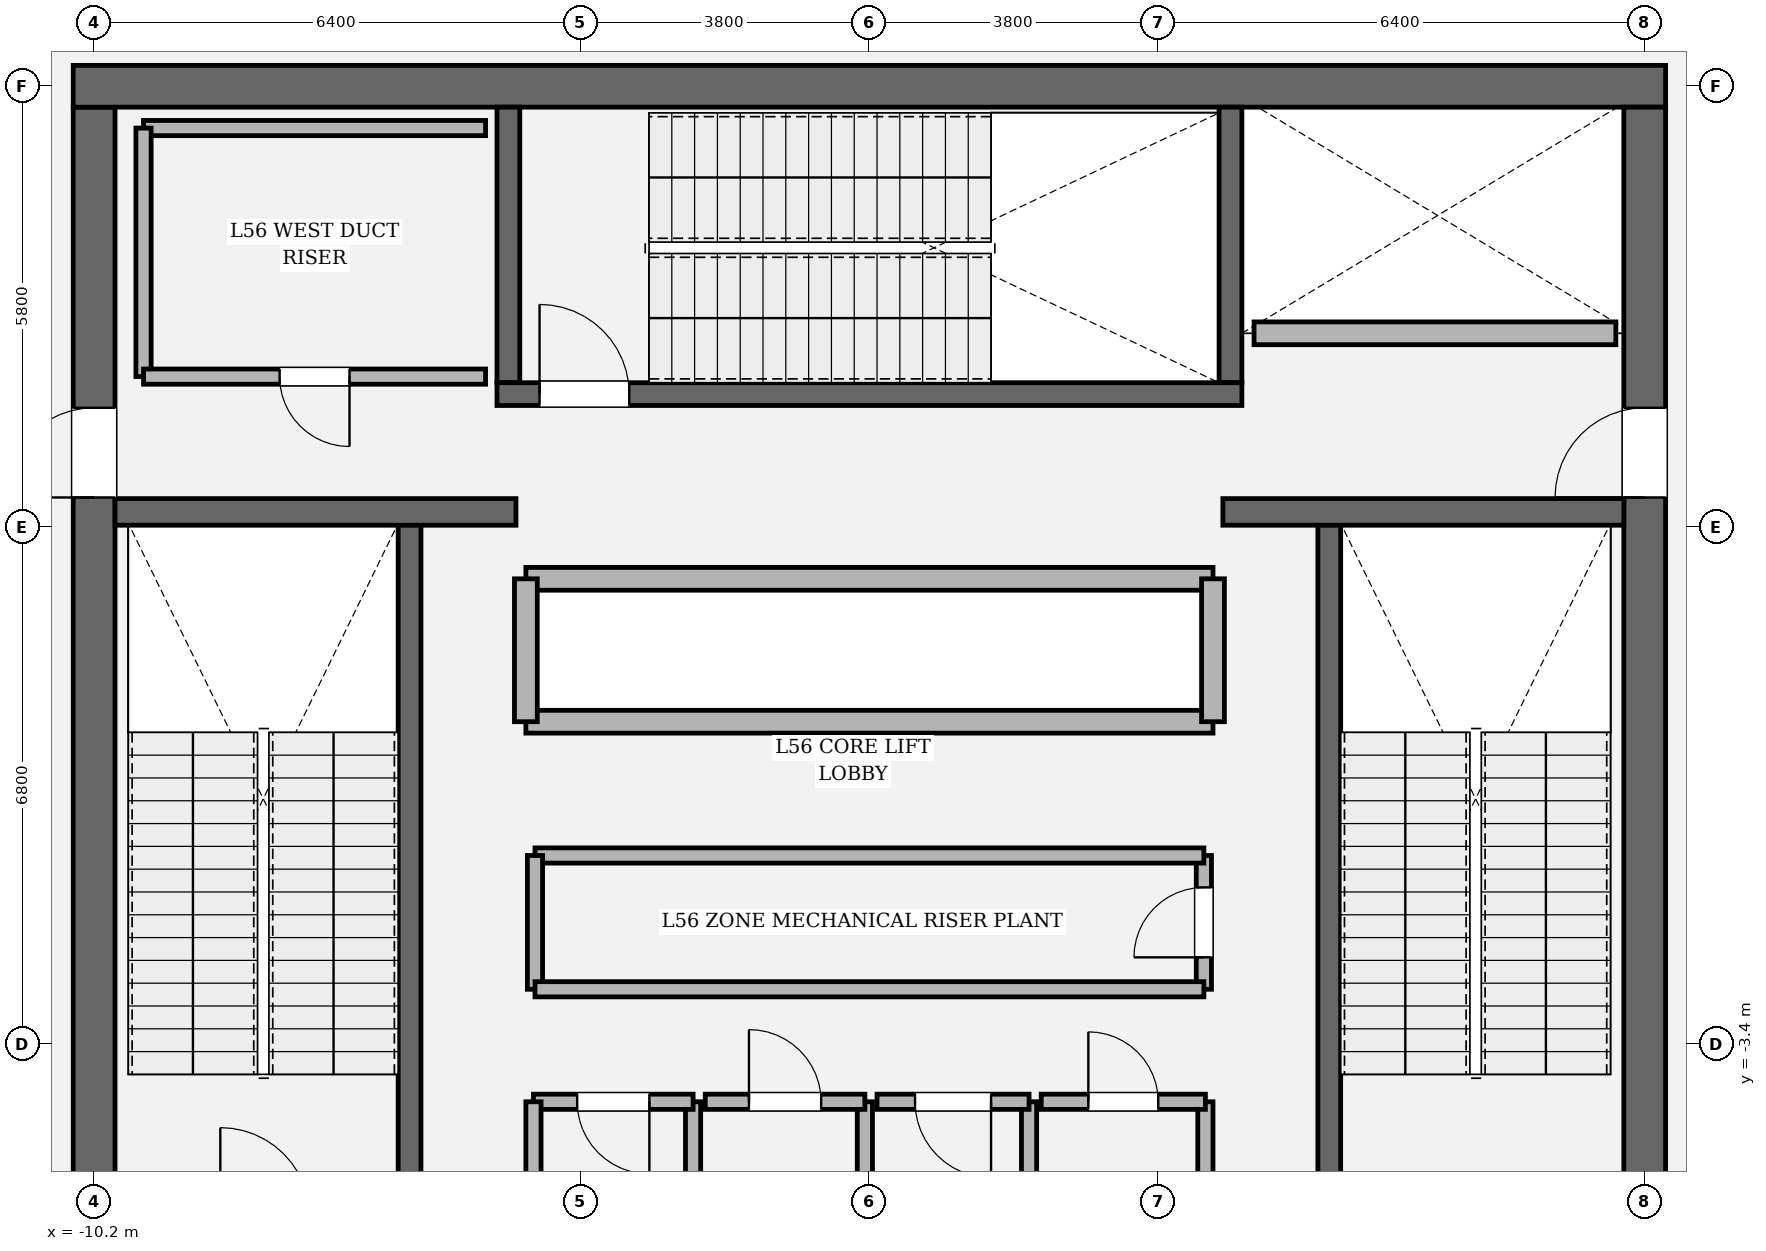
"""IFC4 building model, lengths in metres.
Left out: names, types, materials, properties, quantities, classifications, styles, units other than length and angle.
Written with IfcOpenShell. Run it as: python <this file> out.ifc"""

import sys

from ifc_helpers import new_model, si_unit, direction, frame, frame_2d, origin, place, context, subcontext, project, spatial, rectangle, extrude, element, fill, save


model = new_model("IFC4")
c1 = context("Model", 3, precision=1e-05, world=origin(), true_north=direction((0.0, 1.0)))
c2 = subcontext(c1, "Body", "Model", "MODEL_VIEW")
j1 = project(units=[si_unit("LENGTHUNIT", "METRE"), si_unit("PLANEANGLEUNIT", "RADIAN")], contexts=[c1])
p1 = place(None, origin())
s1 = spatial("IfcSite", under=j1, at=p1, CompositionType="ELEMENT")
p2 = place(p1, origin())
s2 = spatial("IfcBuilding", under=s1, at=p2, CompositionType="ELEMENT")
p3 = place(p2, frame((0.0, 0.0, 237.0)))
s3 = spatial("IfcBuildingStorey", under=s2, at=p3, CompositionType="ELEMENT", Elevation=237.0)
p4 = place(p3, frame((-10.2, -8.925, 0.0), z_axis=(0.0, 0.0, 1.0), x_axis=(0.0, 1.0, 0.0)))
e1 = element("IfcWall", 1, at=p4, inside=s3, PredefinedType="SHEAR", context=c2, shape_type="SweptSolid", body=[
    extrude(rectangle(XDim=17.85, YDim=0.55, at=frame_2d((8.925, 0.0))), origin(), (0.0, 0.0, 1.0), 4.8),
])
p5 = place(p4, frame((12.715, 0.0, 0.0)))
e2 = element("IfcOpeningElement", 2, at=p5, cuts=e1, PredefinedType="OPENING", context=c2, shape_type="SweptSolid", body=[
    extrude(rectangle(XDim=1.18, YDim=2.2, at=frame_2d((0.59, 1.1))), frame((0.0, 0.285, 0.0), z_axis=(0.0, -1.0, 0.0), x_axis=(1.0, 0.0, 0.0)), (0.0, 0.0, 1.0), 0.57),
])
p6 = place(p3, frame((-10.475, 9.2, 0.0), z_axis=(0.0, 0.0, 1.0), x_axis=(1.0, 0.0, 0.0)))
e3 = element("IfcWall", 3, at=p6, inside=s3, PredefinedType="SHEAR", context=c2, shape_type="SweptSolid", body=[
    extrude(rectangle(XDim=20.95, YDim=0.55, at=frame_2d((10.475, 0.0))), origin(), (0.0, 0.0, 1.0), 4.8),
])
p7 = place(p3, frame((10.2, 8.925, 0.0), z_axis=(0.0, 0.0, 1.0), x_axis=(0.0, -1.0, 0.0)))
e4 = element("IfcWall", 4, at=p7, inside=s3, PredefinedType="SHEAR", context=c2, shape_type="SweptSolid", body=[
    extrude(rectangle(XDim=17.85, YDim=0.55, at=frame_2d((8.925, 0.0))), origin(), (0.0, 0.0, 1.0), 4.8),
])
p8 = place(p7, frame((3.955, 0.0, 0.0)))
e5 = element("IfcOpeningElement", 5, at=p8, cuts=e4, PredefinedType="OPENING", context=c2, shape_type="SweptSolid", body=[
    extrude(rectangle(XDim=1.18, YDim=2.2, at=frame_2d((0.59, 1.1))), frame((0.0, 0.285, 0.0), z_axis=(0.0, -1.0, 0.0), x_axis=(1.0, 0.0, 0.0)), (0.0, 0.0, 1.0), 0.57),
])
for number, where, z_axis, x_axis in (
    (6, (-6.05, -5.5, 0.0), (0.0, 0.0, 1.0), (0.0, 1.0, 0.0)),
    (7, (6.05, 3.45, 0.0), (0.0, 0.0, 1.0), (0.0, -1.0, 0.0)),
):
    element("IfcWall", number, at=place(p3, frame(where, z_axis=z_axis, x_axis=x_axis)), inside=s3, PredefinedType="SOLIDWALL", context=c2, shape_type="SweptSolid", body=[
        extrude(rectangle(XDim=8.95, YDim=0.3, at=frame_2d((4.475, 0.0))), origin(), (0.0, 0.0, 1.0), 4.8),
    ])
for number, where, z_axis, x_axis in (
    (8, (-4.75, 5.3, 0.0), (0.0, 0.0, 1.0), (0.0, 1.0, 0.0)),
    (9, (4.75, 8.925, 0.0), (0.0, 0.0, 1.0), (0.0, -1.0, 0.0)),
):
    element("IfcWall", number, at=place(p3, frame(where, z_axis=z_axis, x_axis=x_axis)), inside=s3, PredefinedType="SOLIDWALL", context=c2, shape_type="SweptSolid", body=[
        extrude(rectangle(XDim=3.625, YDim=0.3, at=frame_2d((1.812, 0.0))), origin(), (0.0, 0.0, 1.0), 4.8),
    ])
p9 = place(p3, frame((-4.9, 5.15, 0.0), z_axis=(0.0, 0.0, 1.0), x_axis=(1.0, 0.0, 0.0)))
e10 = element("IfcWall", 10, at=p9, inside=s3, PredefinedType="SOLIDWALL", context=c2, shape_type="SweptSolid", body=[
    extrude(rectangle(XDim=9.8, YDim=0.3, at=frame_2d((4.9, 0.0))), origin(), (0.0, 0.0, 1.0), 4.8),
])
p10 = place(p9, frame((0.56, 0.0, 0.0)))
e11 = element("IfcOpeningElement", 11, at=p10, cuts=e10, PredefinedType="OPENING", context=c2, shape_type="SweptSolid", body=[
    extrude(rectangle(XDim=1.18, YDim=2.2, at=frame_2d((0.59, 1.1))), frame((0.0, 0.16, 0.0), z_axis=(0.0, -1.0, 0.0), x_axis=(1.0, 0.0, 0.0)), (0.0, 0.0, 1.0), 0.32),
])
for number, where, z_axis, x_axis in (
    (12, (-9.925, 3.6, 0.0), (0.0, 0.0, 1.0), (1.0, 0.0, 0.0)),
    (13, (4.65, 3.6, 0.0), (0.0, 0.0, 1.0), (1.0, 0.0, 0.0)),
):
    element("IfcWall", number, at=place(p3, frame(where, z_axis=z_axis, x_axis=x_axis)), inside=s3, PredefinedType="SOLIDWALL", context=c2, shape_type="SweptSolid", body=[
        extrude(rectangle(XDim=5.275, YDim=0.35, at=frame_2d((2.638, 0.0))), origin(), (0.0, 0.0, 1.0), 4.8),
    ])
for number, where, z_axis, x_axis in (
    (14, (-4.52, 0.84, 0.0), (0.0, 0.0, 1.0), (1.0, 0.0, 0.0)),
    (15, (-4.52, 2.72, 0.0), (0.0, 0.0, 1.0), (1.0, 0.0, 0.0)),
):
    element("IfcWall", number, at=place(p3, frame(where, z_axis=z_axis, x_axis=x_axis)), inside=s3, PredefinedType="SOLIDWALL", context=c2, shape_type="SweptSolid", body=[
        extrude(rectangle(XDim=9.04, YDim=0.3, at=frame_2d((4.52, 0.0))), origin(), (0.0, 0.0, 1.0), 4.48),
    ])
for number, where, z_axis, x_axis in (
    (16, (-4.52, 0.84, 0.0), (0.0, 0.0, 1.0), (0.0, 1.0, 0.0)),
    (17, (4.52, 0.84, 0.0), (0.0, 0.0, 1.0), (0.0, 1.0, 0.0)),
):
    element("IfcWall", number, at=place(p3, frame(where, z_axis=z_axis, x_axis=x_axis)), inside=s3, PredefinedType="SOLIDWALL", context=c2, shape_type="SweptSolid", body=[
        extrude(rectangle(XDim=1.88, YDim=0.3, at=frame_2d((0.94, 0.0))), origin(), (0.0, 0.0, 1.0), 4.48),
    ])
p11 = place(p3, frame((5.06, 5.95, 0.0), z_axis=(0.0, 0.0, 1.0), x_axis=(1.0, 0.0, 0.0)))
e18 = element("IfcWall", 18, at=p11, inside=s3, PredefinedType="SOLIDWALL", context=c2, shape_type="SweptSolid", body=[
    extrude(rectangle(XDim=4.76, YDim=0.3, at=frame_2d((2.38, 0.0))), origin(), (0.0, 0.0, 1.0), 4.48),
])
p12 = place(p3, frame((-2.32, -5.9, 0.0), z_axis=(0.0, 0.0, 1.0), x_axis=(0.0, 1.0, 0.0)))
e19 = element("IfcWall", 19, at=p12, inside=s3, PredefinedType="SOLIDWALL", context=c2, shape_type="SweptSolid", body=[
    extrude(rectangle(XDim=1.74, YDim=0.2, at=frame_2d((0.87, 0.0))), origin(), (0.0, 0.0, 1.0), 4.48),
])
p13 = place(p3, frame((-2.32, -4.16, 0.0), z_axis=(0.0, 0.0, 1.0), x_axis=(-1.0, 0.0, 0.0)))
e20 = element("IfcWall", 20, at=p13, inside=s3, PredefinedType="SOLIDWALL", context=c2, shape_type="SweptSolid", body=[
    extrude(rectangle(XDim=2.1, YDim=0.2, at=frame_2d((1.05, 0.0))), origin(), (0.0, 0.0, 1.0), 4.48),
])
p14 = place(p13, frame((0.575, 0.0, 0.0)))
e21 = element("IfcOpeningElement", 21, at=p14, cuts=e20, PredefinedType="OPENING", context=c2, shape_type="SweptSolid", body=[
    extrude(rectangle(XDim=0.95, YDim=2.15, at=frame_2d((0.475, 1.075))), frame((0.0, 0.11, 0.0), z_axis=(0.0, -1.0, 0.0), x_axis=(1.0, 0.0, 0.0)), (0.0, 0.0, 1.0), 0.22),
])
for number, where, z_axis, x_axis in (
    (22, (-4.42, -4.16, 0.0), (0.0, 0.0, 1.0), (0.0, -1.0, 0.0)),
    (23, (-0.06, -5.9, 0.0), (0.0, 0.0, 1.0), (0.0, 1.0, 0.0)),
):
    element("IfcWall", number, at=place(p3, frame(where, z_axis=z_axis, x_axis=x_axis)), inside=s3, PredefinedType="SOLIDWALL", context=c2, shape_type="SweptSolid", body=[
        extrude(rectangle(XDim=1.74, YDim=0.2, at=frame_2d((0.87, 0.0))), origin(), (0.0, 0.0, 1.0), 4.48),
    ])
p15 = place(p3, frame((-0.06, -4.16, 0.0), z_axis=(0.0, 0.0, 1.0), x_axis=(-1.0, 0.0, 0.0)))
e24 = element("IfcWall", 24, at=p15, inside=s3, PredefinedType="SOLIDWALL", context=c2, shape_type="SweptSolid", body=[
    extrude(rectangle(XDim=2.1, YDim=0.2, at=frame_2d((1.05, 0.0))), origin(), (0.0, 0.0, 1.0), 4.48),
])
p16 = place(p15, frame((0.575, 0.0, 0.0)))
e25 = element("IfcOpeningElement", 25, at=p16, cuts=e24, PredefinedType="OPENING", context=c2, shape_type="SweptSolid", body=[
    extrude(rectangle(XDim=0.95, YDim=2.15, at=frame_2d((0.475, 1.075))), frame((0.0, 0.11, 0.0), z_axis=(0.0, -1.0, 0.0), x_axis=(1.0, 0.0, 0.0)), (0.0, 0.0, 1.0), 0.22),
])
p17 = place(p3, frame((2.1, -5.9, 0.0), z_axis=(0.0, 0.0, 1.0), x_axis=(0.0, 1.0, 0.0)))
e26 = element("IfcWall", 26, at=p17, inside=s3, PredefinedType="SOLIDWALL", context=c2, shape_type="SweptSolid", body=[
    extrude(rectangle(XDim=1.74, YDim=0.2, at=frame_2d((0.87, 0.0))), origin(), (0.0, 0.0, 1.0), 4.48),
])
p18 = place(p3, frame((2.1, -4.16, 0.0), z_axis=(0.0, 0.0, 1.0), x_axis=(-1.0, 0.0, 0.0)))
e27 = element("IfcWall", 27, at=p18, inside=s3, PredefinedType="SOLIDWALL", context=c2, shape_type="SweptSolid", body=[
    extrude(rectangle(XDim=2.0, YDim=0.2, at=frame_2d((1.0, 0.0))), origin(), (0.0, 0.0, 1.0), 4.48),
])
p19 = place(p18, frame((0.5, 0.0, 0.0)))
e28 = element("IfcOpeningElement", 28, at=p19, cuts=e27, PredefinedType="OPENING", context=c2, shape_type="SweptSolid", body=[
    extrude(rectangle(XDim=1.0, YDim=2.15, at=frame_2d((0.5, 1.075))), frame((0.0, 0.11, 0.0), z_axis=(0.0, -1.0, 0.0), x_axis=(1.0, 0.0, 0.0)), (0.0, 0.0, 1.0), 0.22),
])
p20 = place(p3, frame((4.42, -5.9, 0.0), z_axis=(0.0, 0.0, 1.0), x_axis=(0.0, 1.0, 0.0)))
e29 = element("IfcWall", 29, at=p20, inside=s3, PredefinedType="SOLIDWALL", context=c2, shape_type="SweptSolid", body=[
    extrude(rectangle(XDim=1.74, YDim=0.2, at=frame_2d((0.87, 0.0))), origin(), (0.0, 0.0, 1.0), 4.48),
])
p21 = place(p3, frame((4.42, -4.16, 0.0), z_axis=(0.0, 0.0, 1.0), x_axis=(-1.0, 0.0, 0.0)))
e30 = element("IfcWall", 30, at=p21, inside=s3, PredefinedType="SOLIDWALL", context=c2, shape_type="SweptSolid", body=[
    extrude(rectangle(XDim=2.16, YDim=0.2, at=frame_2d((1.08, 0.0))), origin(), (0.0, 0.0, 1.0), 4.48),
])
p22 = place(p21, frame((0.62, 0.0, 0.0)))
e31 = element("IfcOpeningElement", 31, at=p22, cuts=e30, PredefinedType="OPENING", context=c2, shape_type="SweptSolid", body=[
    extrude(rectangle(XDim=0.92, YDim=2.1, at=frame_2d((0.46, 1.05))), frame((0.0, 0.11, 0.0), z_axis=(0.0, -1.0, 0.0), x_axis=(1.0, 0.0, 0.0)), (0.0, 0.0, 1.0), 0.22),
])
p23 = place(p3, frame((4.4, -2.68, 0.0), z_axis=(0.0, 0.0, 1.0), x_axis=(0.0, 1.0, 0.0)))
e32 = element("IfcWall", 32, at=p23, inside=s3, PredefinedType="SOLIDWALL", context=c2, shape_type="SweptSolid", body=[
    extrude(rectangle(XDim=1.76, YDim=0.2, at=frame_2d((0.88, 0.0))), origin(), (0.0, 0.0, 1.0), 4.48),
])
p24 = place(p23, frame((0.42, 0.0, 0.0)))
e33 = element("IfcOpeningElement", 33, at=p24, cuts=e32, PredefinedType="OPENING", context=c2, shape_type="SweptSolid", body=[
    extrude(rectangle(XDim=0.92, YDim=2.1, at=frame_2d((0.46, 1.05))), frame((0.0, 0.11, 0.0), z_axis=(0.0, -1.0, 0.0), x_axis=(1.0, 0.0, 0.0)), (0.0, 0.0, 1.0), 0.22),
])
p25 = place(p3, frame((4.4, -0.92, 0.0), z_axis=(0.0, 0.0, 1.0), x_axis=(-1.0, 0.0, 0.0)))
e34 = element("IfcWall", 34, at=p25, inside=s3, PredefinedType="SOLIDWALL", context=c2, shape_type="SweptSolid", body=[
    extrude(rectangle(XDim=8.8, YDim=0.2, at=frame_2d((4.4, 0.0))), origin(), (0.0, 0.0, 1.0), 4.48),
])
p26 = place(p3, frame((-4.4, -0.92, 0.0), z_axis=(0.0, 0.0, 1.0), x_axis=(0.0, -1.0, 0.0)))
e35 = element("IfcWall", 35, at=p26, inside=s3, PredefinedType="SOLIDWALL", context=c2, shape_type="SweptSolid", body=[
    extrude(rectangle(XDim=1.76, YDim=0.2, at=frame_2d((0.88, 0.0))), origin(), (0.0, 0.0, 1.0), 4.48),
])
p27 = place(p3, frame((-4.4, -2.68, 0.0), z_axis=(0.0, 0.0, 1.0), x_axis=(1.0, 0.0, 0.0)))
e36 = element("IfcWall", 36, at=p27, inside=s3, PredefinedType="SOLIDWALL", context=c2, shape_type="SweptSolid", body=[
    extrude(rectangle(XDim=8.8, YDim=0.2, at=frame_2d((4.4, 0.0))), origin(), (0.0, 0.0, 1.0), 4.48),
])
p28 = place(p3, frame((-5.05, 8.65, 0.0), z_axis=(0.0, 0.0, 1.0), x_axis=(-1.0, 0.0, 0.0)))
e37 = element("IfcWall", 37, at=p28, inside=s3, PredefinedType="SOLIDWALL", context=c2, shape_type="SweptSolid", body=[
    extrude(rectangle(XDim=4.5, YDim=0.2, at=frame_2d((2.25, 0.0))), origin(), (0.0, 0.0, 1.0), 4.48),
])
p29 = place(p3, frame((-9.55, 8.65, 0.0), z_axis=(0.0, 0.0, 1.0), x_axis=(0.0, -1.0, 0.0)))
e38 = element("IfcWall", 38, at=p29, inside=s3, PredefinedType="SOLIDWALL", context=c2, shape_type="SweptSolid", body=[
    extrude(rectangle(XDim=3.27, YDim=0.2, at=frame_2d((1.635, 0.0))), origin(), (0.0, 0.0, 1.0), 4.48),
])
p30 = place(p3, frame((-9.55, 5.38, 0.0), z_axis=(0.0, 0.0, 1.0), x_axis=(1.0, 0.0, 0.0)))
e39 = element("IfcWall", 39, at=p30, inside=s3, PredefinedType="SOLIDWALL", context=c2, shape_type="SweptSolid", body=[
    extrude(rectangle(XDim=4.5, YDim=0.2, at=frame_2d((2.25, 0.0))), origin(), (0.0, 0.0, 1.0), 4.48),
])
p31 = place(p30, frame((1.79, 0.0, 0.0)))
e40 = element("IfcOpeningElement", 40, at=p31, cuts=e39, PredefinedType="OPENING", context=c2, shape_type="SweptSolid", body=[
    extrude(rectangle(XDim=0.92, YDim=2.1, at=frame_2d((0.46, 1.05))), frame((0.0, 0.11, 0.0), z_axis=(0.0, -1.0, 0.0), x_axis=(1.0, 0.0, 0.0)), (0.0, 0.0, 1.0), 0.22),
])
p32 = place(p10, origin())
e41 = element("IfcDoor", 41, at=p32, inside=s3, OperationType="SINGLE_SWING_LEFT", PredefinedType="DOOR", context=c2, shape_type="SweptSolid", body=[
    extrude(rectangle(XDim=1.18, YDim=2.2, at=frame_2d((0.59, 1.1))), frame((0.0, 0.025, 0.0), z_axis=(0.0, -1.0, 0.0), x_axis=(1.0, 0.0, 0.0)), (0.0, 0.0, 1.0), 0.05),
])
fill(e11, e41)
p33 = place(p5, origin())
e42 = element("IfcDoor", 42, at=p33, inside=s3, OperationType="SINGLE_SWING_LEFT", PredefinedType="DOOR", context=c2, shape_type="SweptSolid", body=[
    extrude(rectangle(XDim=1.18, YDim=2.2, at=frame_2d((0.59, 1.1))), frame((0.0, 0.025, 0.0), z_axis=(0.0, -1.0, 0.0), x_axis=(1.0, 0.0, 0.0)), (0.0, 0.0, 1.0), 0.05),
])
fill(e2, e42)
p34 = place(p8, origin())
e43 = element("IfcDoor", 43, at=p34, inside=s3, OperationType="SINGLE_SWING_RIGHT", PredefinedType="DOOR", context=c2, shape_type="SweptSolid", body=[
    extrude(rectangle(XDim=1.18, YDim=2.2, at=frame_2d((0.59, 1.1))), frame((0.0, 0.025, 0.0), z_axis=(0.0, -1.0, 0.0), x_axis=(1.0, 0.0, 0.0)), (0.0, 0.0, 1.0), 0.05),
])
fill(e5, e43)
p35 = place(p14, origin())
e44 = element("IfcDoor", 44, at=p35, inside=s3, OperationType="SINGLE_SWING_LEFT", PredefinedType="DOOR", context=c2, shape_type="SweptSolid", body=[
    extrude(rectangle(XDim=0.95, YDim=2.15, at=frame_2d((0.475, 1.075))), frame((0.0, 0.025, 0.0), z_axis=(0.0, -1.0, 0.0), x_axis=(1.0, 0.0, 0.0)), (0.0, 0.0, 1.0), 0.05),
])
fill(e21, e44)
p36 = place(p16, origin())
e45 = element("IfcDoor", 45, at=p36, inside=s3, OperationType="SINGLE_SWING_RIGHT", PredefinedType="DOOR", context=c2, shape_type="SweptSolid", body=[
    extrude(rectangle(XDim=0.95, YDim=2.15, at=frame_2d((0.475, 1.075))), frame((0.0, 0.025, 0.0), z_axis=(0.0, -1.0, 0.0), x_axis=(1.0, 0.0, 0.0)), (0.0, 0.0, 1.0), 0.05),
])
fill(e25, e45)
p37 = place(p19, origin())
e46 = element("IfcDoor", 46, at=p37, inside=s3, OperationType="SINGLE_SWING_LEFT", PredefinedType="DOOR", context=c2, shape_type="SweptSolid", body=[
    extrude(rectangle(XDim=1.0, YDim=2.15, at=frame_2d((0.5, 1.075))), frame((0.0, 0.025, 0.0), z_axis=(0.0, -1.0, 0.0), x_axis=(1.0, 0.0, 0.0)), (0.0, 0.0, 1.0), 0.05),
])
fill(e28, e46)
p38 = place(p22, origin())
e47 = element("IfcDoor", 47, at=p38, inside=s3, OperationType="SINGLE_SWING_RIGHT", PredefinedType="DOOR", context=c2, shape_type="SweptSolid", body=[
    extrude(rectangle(XDim=0.92, YDim=2.1, at=frame_2d((0.46, 1.05))), frame((0.0, 0.025, 0.0), z_axis=(0.0, -1.0, 0.0), x_axis=(1.0, 0.0, 0.0)), (0.0, 0.0, 1.0), 0.05),
])
fill(e31, e47)
p39 = place(p24, origin())
e48 = element("IfcDoor", 48, at=p39, inside=s3, OperationType="SINGLE_SWING_LEFT", PredefinedType="DOOR", context=c2, shape_type="SweptSolid", body=[
    extrude(rectangle(XDim=0.92, YDim=2.1, at=frame_2d((0.46, 1.05))), frame((0.0, 0.025, 0.0), z_axis=(0.0, -1.0, 0.0), x_axis=(1.0, 0.0, 0.0)), (0.0, 0.0, 1.0), 0.05),
])
fill(e33, e48)
p40 = place(p31, origin())
e49 = element("IfcDoor", 49, at=p40, inside=s3, OperationType="SINGLE_SWING_RIGHT", PredefinedType="DOOR", context=c2, shape_type="SweptSolid", body=[
    extrude(rectangle(XDim=0.92, YDim=2.1, at=frame_2d((0.46, 1.05))), frame((0.0, 0.025, 0.0), z_axis=(0.0, -1.0, 0.0), x_axis=(1.0, 0.0, 0.0)), (0.0, 0.0, 1.0), 0.05),
])
fill(e40, e49)
save(model, sys.argv[1])
